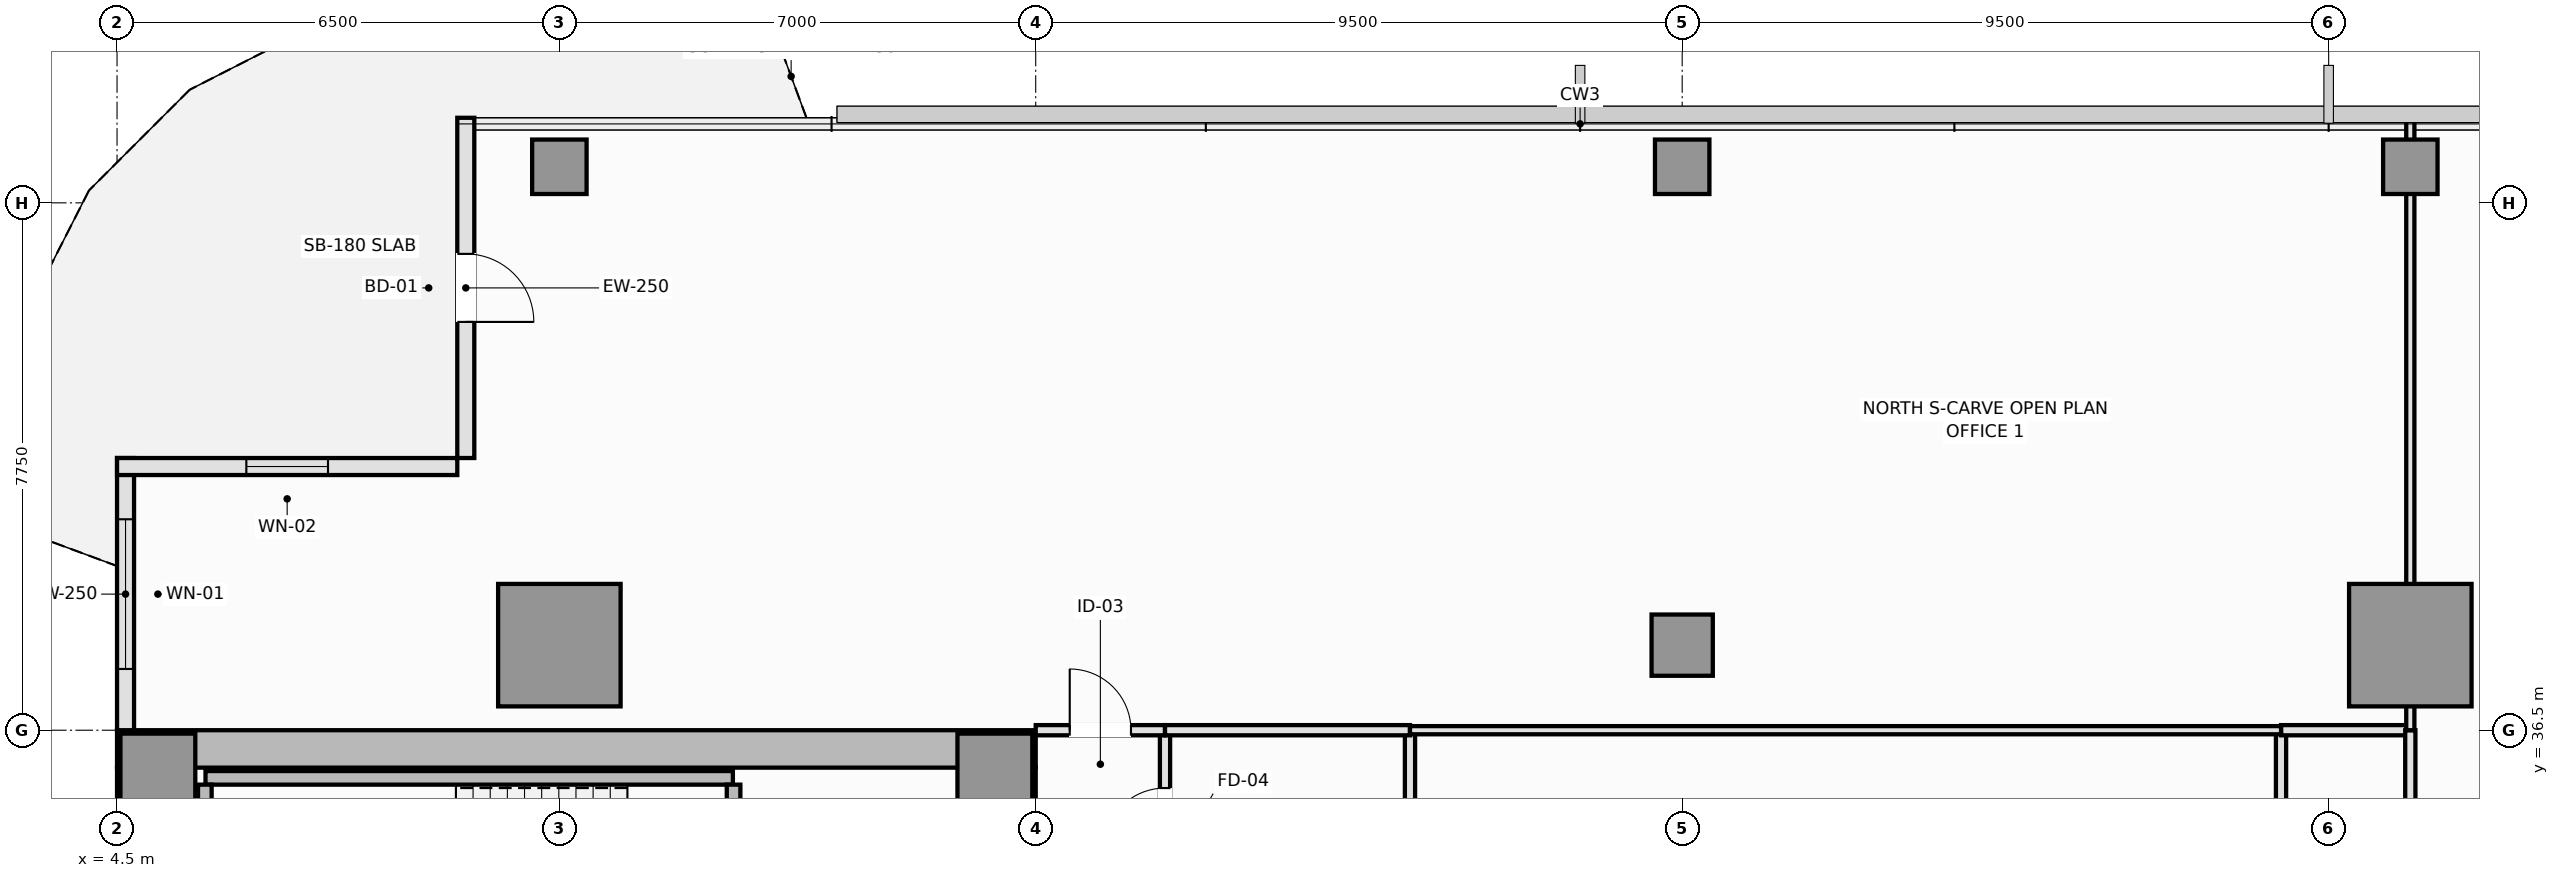
"""IFC4 building model, lengths in metres.
Left out: names, types, materials, properties, quantities, classifications, styles, units other than length and angle.
Written with IfcOpenShell. Run it as: python <this file> out.ifc"""

import sys

from ifc_helpers import new_model, si_unit, direction, frame, frame_2d, origin, origin_2d, place, context, subcontext, project, spatial, rectangle, extrude, element, fill, save


model = new_model("IFC4")
c1 = context("Model", 3, precision=1e-05, world=origin(), true_north=direction((0.0, 1.0)))
c2 = subcontext(c1, "Body", "Model", "MODEL_VIEW")
j1 = project(units=[si_unit("LENGTHUNIT", "METRE"), si_unit("PLANEANGLEUNIT", "RADIAN")], contexts=[c1])
p1 = place(None, origin())
s1 = spatial("IfcSite", under=j1, at=p1, CompositionType="ELEMENT")
p2 = place(p1, origin())
s2 = spatial("IfcBuilding", under=s1, at=p2, CompositionType="ELEMENT")
p3 = place(p2, frame((0.0, 0.0, 209.35)))
s3 = spatial("IfcBuildingStorey", under=s2, at=p3, CompositionType="ELEMENT", Elevation=209.35)
p4 = place(p3, frame((4.5, 36.225, 0.0), z_axis=(0.0, 0.0, 1.0), x_axis=(1.0, 0.0, 0.0)))
e1 = element("IfcWall", 1, at=p4, inside=s3, PredefinedType="SHEAR", context=c2, shape_type="SweptSolid", body=[
    extrude(rectangle(XDim=13.5, YDim=0.55, at=frame_2d((6.75, 0.0))), origin(), (0.0, 0.0, 1.0), 3.55),
])
p5 = place(p3, frame((4.775, 14.55, 0.0), z_axis=(0.0, 0.0, 1.0), x_axis=(0.0, 1.0, 0.0)))
e2 = element("IfcWall", 2, at=p5, inside=s3, PredefinedType="SHEAR", context=c2, shape_type="SweptSolid", body=[
    extrude(rectangle(XDim=21.4, YDim=0.55, at=frame_2d((10.7, 0.0))), origin(), (0.0, 0.0, 1.0), 3.55),
])
p6 = place(p3, frame((17.725, 27.05, 0.0), z_axis=(0.0, 0.0, 1.0), x_axis=(0.0, 1.0, 0.0)))
e3 = element("IfcWall", 3, at=p6, inside=s3, PredefinedType="SHEAR", context=c2, shape_type="SweptSolid", body=[
    extrude(rectangle(XDim=8.9, YDim=0.55, at=frame_2d((4.45, 0.0))), origin(), (0.0, 0.0, 1.0), 3.55),
])
p7 = place(p6, frame((3.45, 0.0, 0.0)))
e4 = element("IfcOpeningElement", 4, at=p7, cuts=e3, PredefinedType="OPENING", context=c2, shape_type="SweptSolid", body=[
    extrude(rectangle(XDim=1.1, YDim=2.15, at=frame_2d((0.55, 1.075))), frame((0.0, 0.285, 0.0), z_axis=(0.0, -1.0, 0.0), x_axis=(1.0, 0.0, 0.0)), (0.0, 0.0, 1.0), 0.57),
])
for number, where, z_axis, x_axis in (
    (5, (5.1, 35.9, 0.0), (0.0, 0.0, 1.0), (1.0, 0.0, 0.0)),
    (6, (17.4, 35.9, 0.0), (0.0, 0.0, 1.0), (1.0, 0.0, 0.0)),
):
    element("IfcColumn", number, at=place(p3, frame(where, z_axis=z_axis, x_axis=x_axis)), inside=s3, PredefinedType="PILASTER", context=c2, shape_type="SweptSolid", body=[
        extrude(rectangle(XDim=1.1, YDim=1.1, at=origin_2d()), origin(), (0.0, 0.0, 1.0), 3.55),
    ])
for number, where, z_axis, x_axis in (
    (7, (11.0, 37.75, 0.0), (0.0, 0.0, 1.0), (1.0, 0.0, 0.0)),
    (8, (38.2, 37.75, 0.0), (0.0, 0.0, 1.0), (1.0, 0.0, 0.0)),
):
    element("IfcColumn", number, at=place(p3, frame(where, z_axis=z_axis, x_axis=x_axis)), inside=s3, PredefinedType="COLUMN", context=c2, shape_type="SweptSolid", body=[
        extrude(rectangle(XDim=1.8, YDim=1.8, at=origin_2d()), origin(), (0.0, 0.0, 1.0), 3.55),
    ])
p8 = place(p3, frame((27.5, 37.75, 0.0), z_axis=(0.0, 0.0, 1.0), x_axis=(1.0, 0.0, 0.0)))
e9 = element("IfcColumn", 9, at=p8, inside=s3, PredefinedType="COLUMN", context=c2, shape_type="SweptSolid", body=[
    extrude(rectangle(XDim=0.9, YDim=0.9, at=origin_2d()), origin(), (0.0, 0.0, 1.0), 3.55),
])
for number, where, z_axis, x_axis in (
    (10, (11.0, 44.78, 0.0), (0.0, 0.0, 1.0), (1.0, 0.0, 0.0)),
    (11, (27.5, 44.78, 0.0), (0.0, 0.0, 1.0), (1.0, 0.0, 0.0)),
    (12, (38.2, 44.78, 0.0), (0.0, 0.0, 1.0), (1.0, 0.0, 0.0)),
):
    element("IfcColumn", number, at=place(p3, frame(where, z_axis=z_axis, x_axis=x_axis)), inside=s3, PredefinedType="COLUMN", context=c2, shape_type="SweptSolid", body=[
        extrude(rectangle(XDim=0.8, YDim=0.8, at=origin_2d()), origin(), (0.0, 0.0, 1.0), 3.55),
    ])
p9 = place(p3, frame((4.625, 40.5, 0.0), z_axis=(0.0, 0.0, 1.0), x_axis=(0.0, -1.0, 0.0)))
e13 = element("IfcWall", 13, at=p9, inside=s3, PredefinedType="SOLIDWALL", context=c2, shape_type="SweptSolid", body=[
    extrude(rectangle(XDim=4.0, YDim=0.25, at=frame_2d((2.0, 0.0))), origin(), (0.0, 0.0, 1.0), 3.37),
])
p10 = place(p9, frame((0.9, 0.0, 0.9)))
e14 = element("IfcOpeningElement", 14, at=p10, cuts=e13, PredefinedType="OPENING", context=c2, shape_type="SweptSolid", body=[
    extrude(rectangle(XDim=2.2, YDim=1.8, at=frame_2d((1.1, 0.9))), frame((0.0, 0.135, 0.0), z_axis=(0.0, -1.0, 0.0), x_axis=(1.0, 0.0, 0.0)), (0.0, 0.0, 1.0), 0.27),
])
p11 = place(p3, frame((9.625, 45.5, 0.0), z_axis=(0.0, 0.0, 1.0), x_axis=(0.0, -1.0, 0.0)))
e15 = element("IfcWall", 15, at=p11, inside=s3, PredefinedType="SOLIDWALL", context=c2, shape_type="SweptSolid", body=[
    extrude(rectangle(XDim=5.0, YDim=0.25, at=frame_2d((2.5, 0.0))), origin(), (0.0, 0.0, 1.0), 3.1),
])
p12 = place(p11, frame((2.0, 0.0, 0.0)))
e16 = element("IfcOpeningElement", 16, at=p12, cuts=e15, PredefinedType="OPENING", context=c2, shape_type="SweptSolid", body=[
    extrude(rectangle(XDim=1.0, YDim=2.2, at=frame_2d((0.5, 1.1))), frame((0.0, 0.135, 0.0), z_axis=(0.0, -1.0, 0.0), x_axis=(1.0, 0.0, 0.0)), (0.0, 0.0, 1.0), 0.27),
])
p13 = place(p3, frame((9.5, 40.375, 0.0), z_axis=(0.0, 0.0, 1.0), x_axis=(-1.0, 0.0, 0.0)))
e17 = element("IfcWall", 17, at=p13, inside=s3, PredefinedType="SOLIDWALL", context=c2, shape_type="SweptSolid", body=[
    extrude(rectangle(XDim=5.0, YDim=0.25, at=frame_2d((2.5, 0.0))), origin(), (0.0, 0.0, 1.0), 3.37),
])
p14 = place(p13, frame((1.9, 0.0, 0.9)))
e18 = element("IfcOpeningElement", 18, at=p14, cuts=e17, PredefinedType="OPENING", context=c2, shape_type="SweptSolid", body=[
    extrude(rectangle(XDim=1.2, YDim=1.8, at=frame_2d((0.6, 0.9))), frame((0.0, 0.135, 0.0), z_axis=(0.0, -1.0, 0.0), x_axis=(1.0, 0.0, 0.0)), (0.0, 0.0, 1.0), 0.27),
])
p15 = place(p3, frame((5.8, 35.8, 0.0), z_axis=(0.0, 0.0, 1.0), x_axis=(1.0, 0.0, 0.0)))
e19 = element("IfcWall", 19, at=p15, inside=s3, PredefinedType="SOLIDWALL", context=c2, shape_type="SweptSolid", body=[
    extrude(rectangle(XDim=7.75, YDim=0.2, at=frame_2d((3.875, 0.0))), origin(), (0.0, 0.0, 1.0), 3.55),
])
p16 = place(p3, frame((5.79, 32.65, 0.0), z_axis=(0.0, 0.0, 1.0), x_axis=(0.0, 1.0, 0.0)))
e20 = element("IfcWall", 20, at=p16, inside=s3, PredefinedType="SOLIDWALL", context=c2, shape_type="SweptSolid", body=[
    extrude(rectangle(XDim=3.05, YDim=0.2, at=frame_2d((1.525, 0.0))), origin(), (0.0, 0.0, 1.0), 3.55),
])
p17 = place(p3, frame((13.56, 32.65, 0.0), z_axis=(0.0, 0.0, 1.0), x_axis=(0.0, 1.0, 0.0)))
e21 = element("IfcWall", 21, at=p17, inside=s3, PredefinedType="SOLIDWALL", context=c2, shape_type="SweptSolid", body=[
    extrude(rectangle(XDim=3.05, YDim=0.2, at=frame_2d((1.525, 0.0))), origin(), (0.0, 0.0, 1.0), 3.55),
])
p18 = place(p17, frame((0.95, 0.0, 0.0)))
e22 = element("IfcOpeningElement", 22, at=p18, cuts=e21, PredefinedType="OPENING", context=c2, shape_type="SweptSolid", body=[
    extrude(rectangle(XDim=1.15, YDim=2.15, at=frame_2d((0.575, 1.075))), frame((0.0, 0.11, 0.0), z_axis=(0.0, -1.0, 0.0), x_axis=(1.0, 0.0, 0.0)), (0.0, 0.0, 1.0), 0.22),
])
p19 = place(p3, frame((19.9, 33.9, 0.0), z_axis=(0.0, 0.0, 1.0), x_axis=(0.0, 1.0, 0.0)))
e23 = element("IfcWall", 23, at=p19, inside=s3, PredefinedType="PLUMBINGWALL", context=c2, shape_type="SweptSolid", body=[
    extrude(rectangle(XDim=2.6, YDim=0.15, at=frame_2d((1.3, 0.0))), origin(), (0.0, 0.0, 1.0), 3.37),
])
p20 = place(p19, frame((0.85, 0.0, 0.0)))
e24 = element("IfcOpeningElement", 24, at=p20, cuts=e23, PredefinedType="OPENING", context=c2, shape_type="SweptSolid", body=[
    extrude(rectangle(XDim=0.9, YDim=2.1, at=frame_2d((0.45, 1.05))), frame((0.0, 0.085, 0.0), z_axis=(0.0, -1.0, 0.0), x_axis=(1.0, 0.0, 0.0)), (0.0, 0.0, 1.0), 0.17),
])
p21 = place(p3, frame((18.0, 36.5, 0.0), z_axis=(0.0, 0.0, 1.0), x_axis=(1.0, 0.0, 0.0)))
e25 = element("IfcWall", 25, at=p21, inside=s3, PredefinedType="PARTITIONING", context=c2, shape_type="SweptSolid", body=[
    extrude(rectangle(XDim=1.9, YDim=0.15, at=frame_2d((0.95, 0.0))), origin(), (0.0, 0.0, 1.0), 3.37),
])
p22 = place(p21, frame((0.5, 0.0, 0.0)))
e26 = element("IfcOpeningElement", 26, at=p22, cuts=e25, PredefinedType="OPENING", context=c2, shape_type="SweptSolid", body=[
    extrude(rectangle(XDim=0.9, YDim=2.1, at=frame_2d((0.45, 1.05))), frame((0.0, 0.085, 0.0), z_axis=(0.0, -1.0, 0.0), x_axis=(1.0, 0.0, 0.0)), (0.0, 0.0, 1.0), 0.17),
])
p23 = place(p3, frame((36.3, 31.8, 0.0), z_axis=(0.0, 0.0, 1.0), x_axis=(0.0, 1.0, 0.0)))
e27 = element("IfcWall", 27, at=p23, inside=s3, PredefinedType="PARTITIONING", context=c2, shape_type="SweptSolid", body=[
    extrude(rectangle(XDim=4.7, YDim=0.15, at=frame_2d((2.35, 0.0))), origin(), (0.0, 0.0, 1.0), 3.37),
])
p24 = place(p23, frame((1.85, 0.0, 0.0)))
e28 = element("IfcOpeningElement", 28, at=p24, cuts=e27, PredefinedType="OPENING", context=c2, shape_type="SweptSolid", body=[
    extrude(rectangle(XDim=1.0, YDim=2.15, at=frame_2d((0.5, 1.075))), frame((0.0, 0.085, 0.0), z_axis=(0.0, -1.0, 0.0), x_axis=(1.0, 0.0, 0.0)), (0.0, 0.0, 1.0), 0.17),
])
p25 = place(p3, frame((36.3, 36.5, 0.0), z_axis=(0.0, 0.0, 1.0), x_axis=(1.0, 0.0, 0.0)))
e29 = element("IfcWall", 29, at=p25, inside=s3, PredefinedType="PARTITIONING", context=c2, shape_type="SweptSolid", body=[
    extrude(rectangle(XDim=1.9, YDim=0.15, at=frame_2d((0.95, 0.0))), origin(), (0.0, 0.0, 1.0), 3.37),
])
p26 = place(p3, frame((38.2, 29.7, 0.0), z_axis=(0.0, 0.0, 1.0), x_axis=(0.0, 1.0, 0.0)))
e30 = element("IfcWall", 30, at=p26, inside=s3, PredefinedType="PARTITIONING", context=c2, shape_type="SweptSolid", body=[
    extrude(rectangle(XDim=6.8, YDim=0.15, at=frame_2d((3.4, 0.0))), origin(), (0.0, 0.0, 1.0), 2.92),
])
p27 = place(p26, frame((3.121, 0.0, 0.0)))
e31 = element("IfcOpeningElement", 31, at=p27, cuts=e30, PredefinedType="OPENING", context=c2, shape_type="SweptSolid", body=[
    extrude(rectangle(XDim=1.0, YDim=2.15, at=frame_2d((0.5, 1.075))), frame((0.0, 0.085, 0.0), z_axis=(0.0, -1.0, 0.0), x_axis=(1.0, 0.0, 0.0)), (0.0, 0.0, 1.0), 0.17),
])
p28 = place(p3, frame((23.5, 33.9, 0.0), z_axis=(0.0, 0.0, 1.0), x_axis=(0.0, 1.0, 0.0)))
e32 = element("IfcWall", 32, at=p28, inside=s3, PredefinedType="PLUMBINGWALL", context=c2, shape_type="SweptSolid", body=[
    extrude(rectangle(XDim=2.6, YDim=0.15, at=frame_2d((1.3, 0.0))), origin(), (0.0, 0.0, 1.0), 3.37),
])
p29 = place(p3, frame((19.9, 36.5, 0.0), z_axis=(0.0, 0.0, 1.0), x_axis=(1.0, 0.0, 0.0)))
e33 = element("IfcWall", 33, at=p29, inside=s3, PredefinedType="PLUMBINGWALL", context=c2, shape_type="SweptSolid", body=[
    extrude(rectangle(XDim=3.6, YDim=0.15, at=frame_2d((1.8, 0.0))), origin(), (0.0, 0.0, 1.0), 3.37),
])
p30 = place(p3, frame((23.5, 36.5, 0.0), z_axis=(0.0, 0.0, 1.0), x_axis=(1.0, 0.0, 0.0)))
e34 = element("IfcWall", 34, at=p30, inside=s3, PredefinedType="PARTITIONING", context=c2, shape_type="SweptSolid", body=[
    extrude(rectangle(XDim=12.8, YDim=0.12, at=frame_2d((6.4, 0.0))), origin(), (0.0, 0.0, 1.0), 3.37),
])
p31 = place(p3, frame((38.2, 36.5, 0.0), z_axis=(0.0, 0.0, 1.0), x_axis=(0.0, 1.0, 0.0)))
e35 = element("IfcWall", 35, at=p31, inside=s3, PredefinedType="PARTITIONING", context=c2, shape_type="SweptSolid", body=[
    extrude(rectangle(XDim=8.99, YDim=0.12, at=frame_2d((4.495, 0.0))), origin(), (0.0, 0.0, 1.0), 2.92),
])
p32 = place(p10, origin())
e36 = element("IfcWindow", 36, at=p32, inside=s3, PartitioningType="SINGLE_PANEL", PredefinedType="WINDOW", context=c2, shape_type="SweptSolid", body=[
    extrude(rectangle(XDim=2.2, YDim=1.8, at=frame_2d((1.1, 0.9))), frame((0.0, 0.03, 0.0), z_axis=(0.0, -1.0, 0.0), x_axis=(1.0, 0.0, 0.0)), (0.0, 0.0, 1.0), 0.06),
])
fill(e14, e36)
p33 = place(p12, frame((1.0, 0.0, 0.0), z_axis=(0.0, 0.0, 1.0), x_axis=(-1.0, 0.0, 0.0)))
e37 = element("IfcDoor", 37, at=p33, inside=s3, OperationType="SINGLE_SWING_RIGHT", PredefinedType="DOOR", context=c2, shape_type="SweptSolid", body=[
    extrude(rectangle(XDim=1.0, YDim=2.2, at=frame_2d((0.5, 1.1))), frame((0.0, 0.025, 0.0), z_axis=(0.0, -1.0, 0.0), x_axis=(1.0, 0.0, 0.0)), (0.0, 0.0, 1.0), 0.05),
])
fill(e16, e37)
p34 = place(p14, origin())
e38 = element("IfcWindow", 38, at=p34, inside=s3, PartitioningType="SINGLE_PANEL", PredefinedType="WINDOW", context=c2, shape_type="SweptSolid", body=[
    extrude(rectangle(XDim=1.2, YDim=1.8, at=frame_2d((0.6, 0.9))), frame((0.0, 0.03, 0.0), z_axis=(0.0, -1.0, 0.0), x_axis=(1.0, 0.0, 0.0)), (0.0, 0.0, 1.0), 0.06),
])
fill(e18, e38)
p35 = place(p20, origin())
e39 = element("IfcDoor", 39, at=p35, inside=s3, OperationType="SINGLE_SWING_LEFT", PredefinedType="DOOR", context=c2, shape_type="SweptSolid", body=[
    extrude(rectangle(XDim=0.9, YDim=2.1, at=frame_2d((0.45, 1.05))), frame((0.0, 0.025, 0.0), z_axis=(0.0, -1.0, 0.0), x_axis=(1.0, 0.0, 0.0)), (0.0, 0.0, 1.0), 0.05),
])
fill(e24, e39)
p36 = place(p22, origin())
e40 = element("IfcDoor", 40, at=p36, inside=s3, OperationType="SINGLE_SWING_LEFT", PredefinedType="DOOR", context=c2, shape_type="SweptSolid", body=[
    extrude(rectangle(XDim=0.9, YDim=2.1, at=frame_2d((0.45, 1.05))), frame((0.0, 0.025, 0.0), z_axis=(0.0, -1.0, 0.0), x_axis=(1.0, 0.0, 0.0)), (0.0, 0.0, 1.0), 0.05),
])
fill(e26, e40)
save(model, sys.argv[1])
